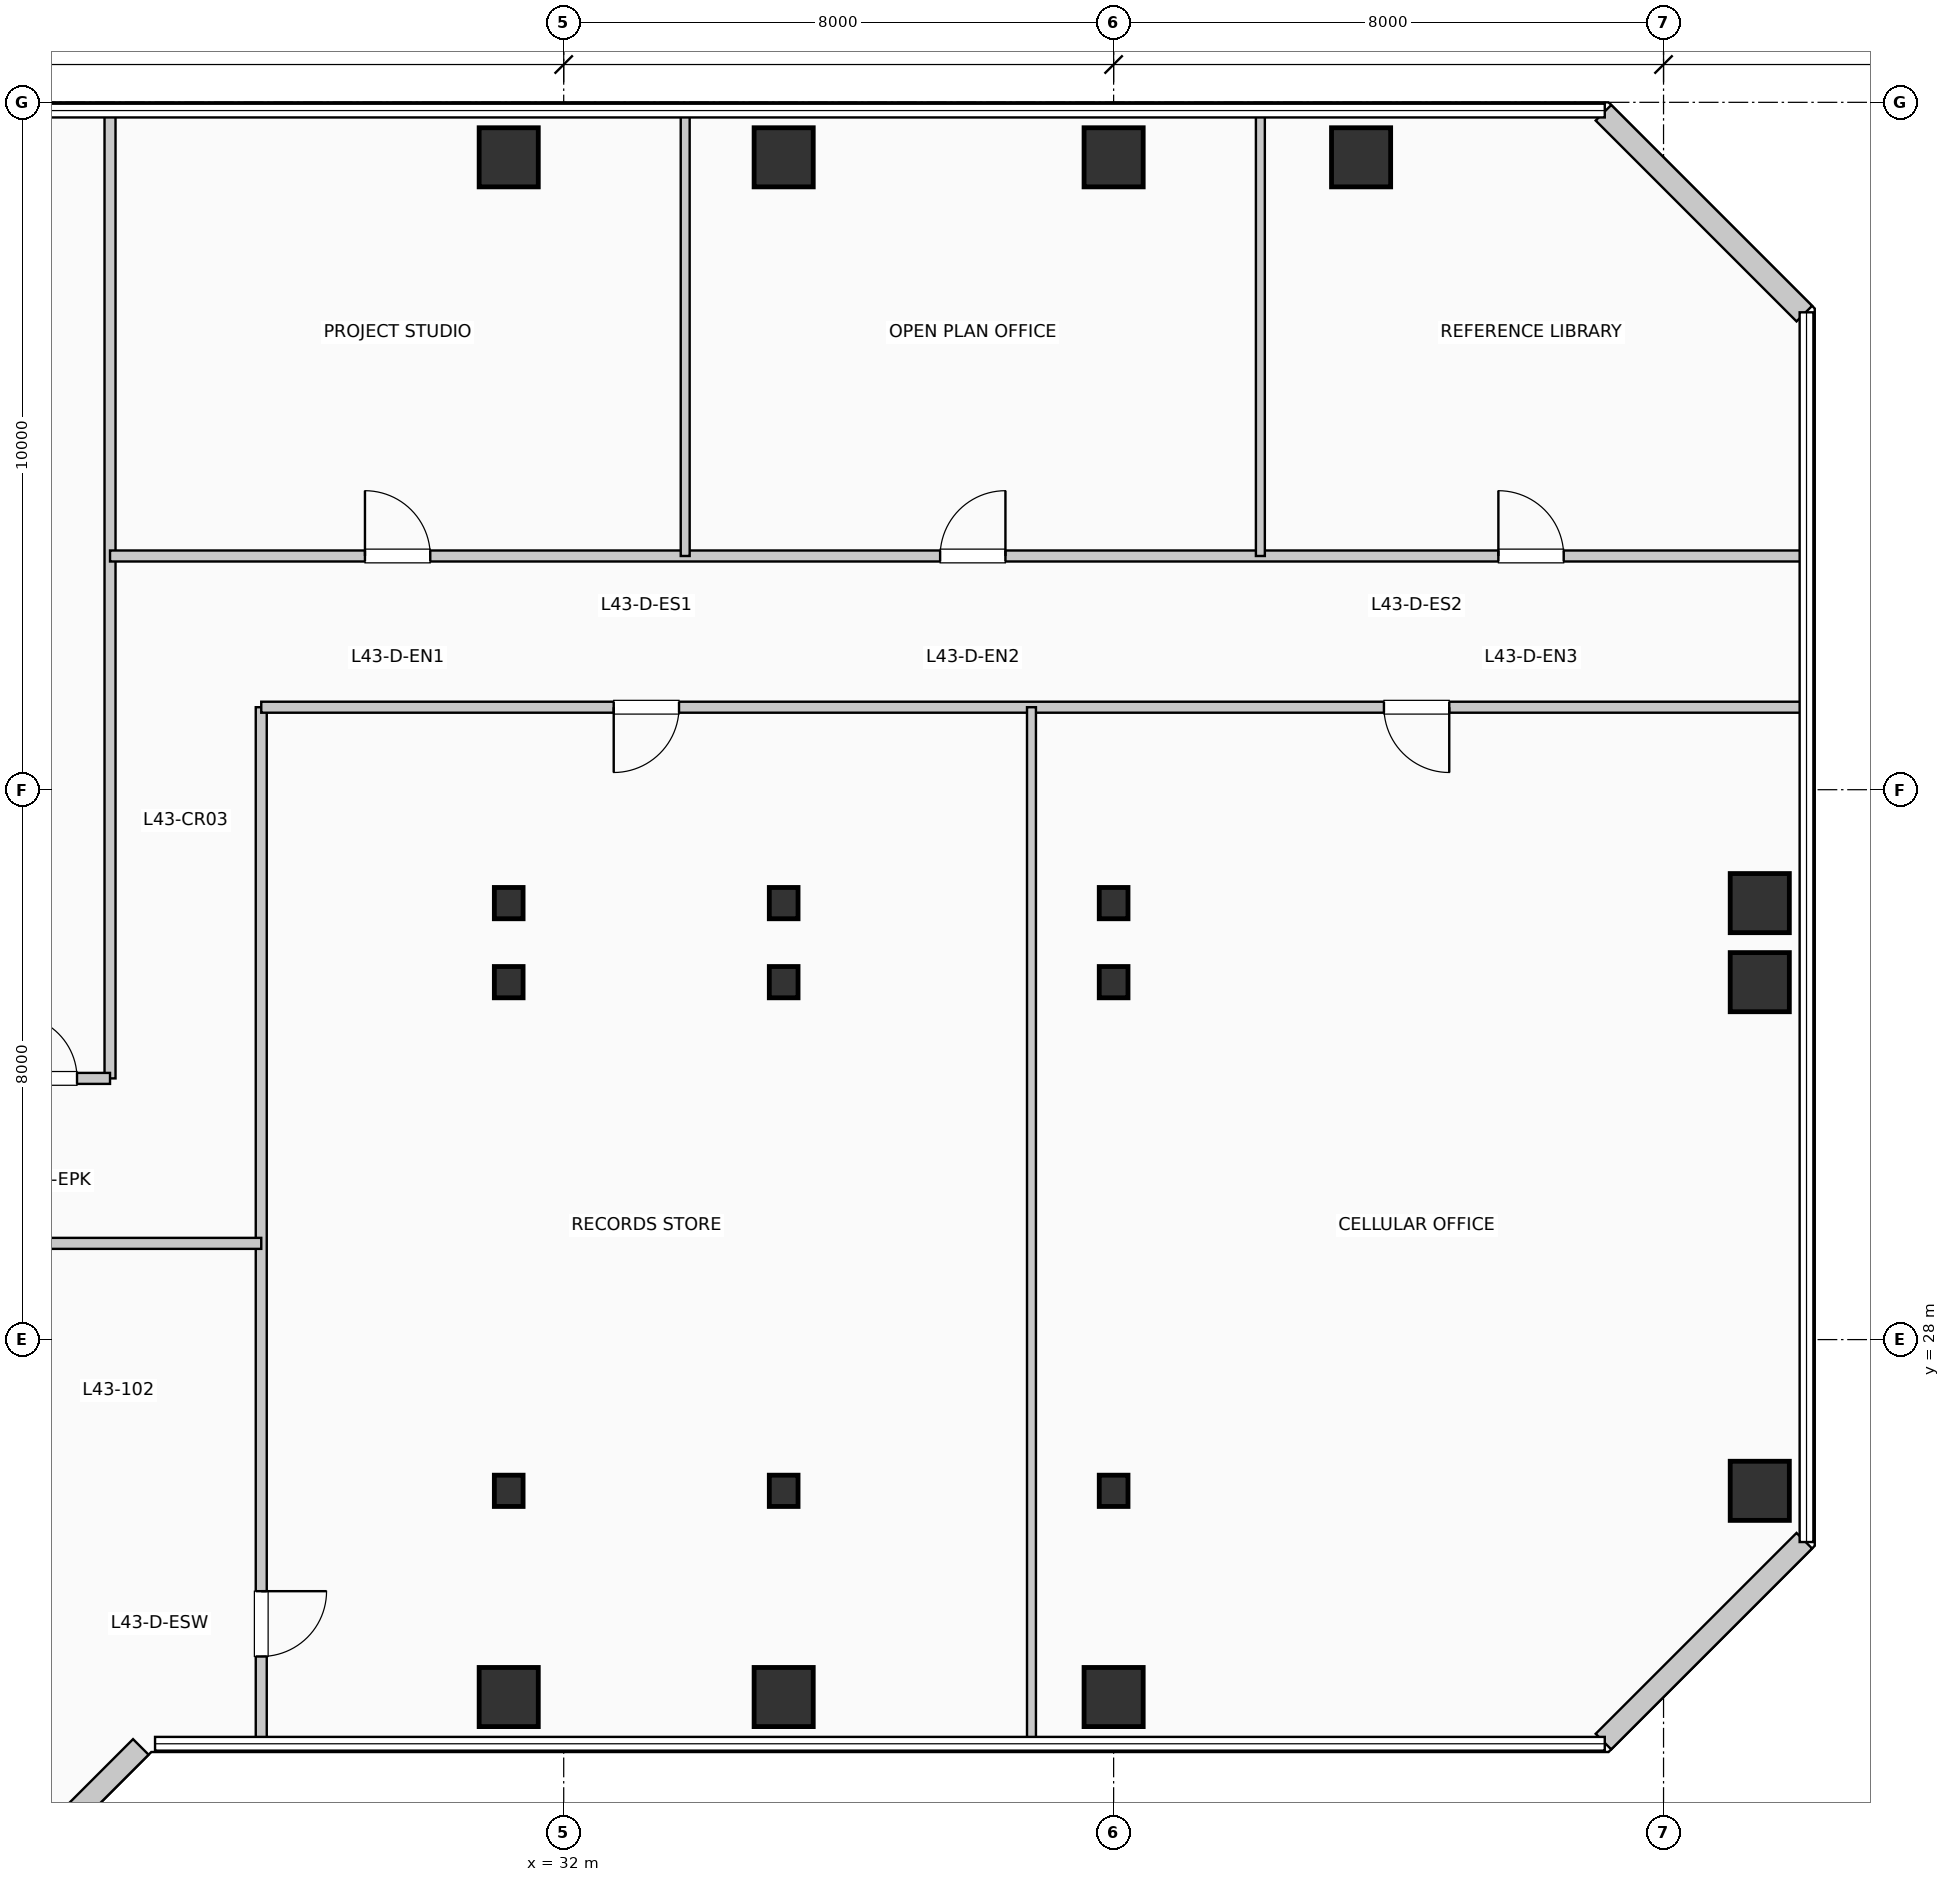
"""IFC4 building model, lengths in metres.
Left out: names, types, materials, properties, quantities, classifications, styles, units other than length and angle.
Written with IfcOpenShell. Run it as: python <this file> out.ifc"""

import sys

from ifc_helpers import new_model, si_unit, direction, frame, frame_2d, origin, origin_2d, place, context, subcontext, project, spatial, rectangle, i_section, extrude, element, fill, save


model = new_model("IFC4")
c1 = context("Model", 3, precision=1e-05, world=origin(), true_north=direction((0.0, 1.0)))
c2 = subcontext(c1, "Body", "Model", "MODEL_VIEW")
j1 = project(units=[si_unit("LENGTHUNIT", "METRE"), si_unit("PLANEANGLEUNIT", "RADIAN")], contexts=[c1])
p1 = place(None, origin())
s1 = spatial("IfcSite", under=j1, at=p1, CompositionType="ELEMENT")
p2 = place(p1, origin())
s2 = spatial("IfcBuilding", under=s1, at=p2, CompositionType="ELEMENT")
p3 = place(p2, frame((0.0, 0.0, 179.52)))
s3 = spatial("IfcBuildingStorey", under=s2, at=p3, CompositionType="ELEMENT", Elevation=179.52)
p4 = place(p3, frame((31.2, 22.8, 0.0), z_axis=(0.0, 0.0, 1.0), x_axis=(1.0, 0.0, 0.0)))
e1 = element("IfcColumn", 1, at=p4, inside=s3, PredefinedType="COLUMN", context=c2, shape_type="SweptSolid", body=[
    extrude(rectangle(XDim=0.86, YDim=0.86, at=origin_2d()), origin(), (0.0, 0.0, 1.0), 3.96),
])
for number, where, z_axis, x_axis in (
    (2, (31.2, 25.8, 0.0), (0.0, 0.0, 1.0), (1.0, 0.0, 0.0)),
    (3, (31.2, 33.2, 0.0), (0.0, 0.0, 1.0), (1.0, 0.0, 0.0)),
    (4, (31.2, 34.35, 0.0), (0.0, 0.0, 1.0), (1.0, 0.0, 0.0)),
):
    element("IfcColumn", number, at=place(p3, frame(where, z_axis=z_axis, x_axis=x_axis)), inside=s3, PredefinedType="COLUMN", context=c2, shape_type="SweptSolid", body=[
        extrude(i_section(OverallWidth=0.418, OverallDepth=0.455, WebThickness=0.032, FlangeThickness=0.051, at=origin_2d()), origin(), (0.0, 0.0, 1.0), 3.96),
    ])
for number, where, z_axis, x_axis in (
    (5, (31.2, 45.2, 0.0), (0.0, 0.0, 1.0), (1.0, 0.0, 0.0)),
    (6, (35.2, 22.8, 0.0), (0.0, 0.0, 1.0), (1.0, 0.0, 0.0)),
):
    element("IfcColumn", number, at=place(p3, frame(where, z_axis=z_axis, x_axis=x_axis)), inside=s3, PredefinedType="COLUMN", context=c2, shape_type="SweptSolid", body=[
        extrude(rectangle(XDim=0.86, YDim=0.86, at=origin_2d()), origin(), (0.0, 0.0, 1.0), 3.96),
    ])
for number, where, z_axis, x_axis in (
    (7, (35.2, 25.8, 0.0), (0.0, 0.0, 1.0), (1.0, 0.0, 0.0)),
    (8, (35.2, 33.2, 0.0), (0.0, 0.0, 1.0), (1.0, 0.0, 0.0)),
    (9, (35.2, 34.35, 0.0), (0.0, 0.0, 1.0), (1.0, 0.0, 0.0)),
):
    element("IfcColumn", number, at=place(p3, frame(where, z_axis=z_axis, x_axis=x_axis)), inside=s3, PredefinedType="COLUMN", context=c2, shape_type="SweptSolid", body=[
        extrude(i_section(OverallWidth=0.418, OverallDepth=0.455, WebThickness=0.032, FlangeThickness=0.051, at=origin_2d()), origin(), (0.0, 0.0, 1.0), 3.96),
    ])
for number, where, z_axis, x_axis in (
    (10, (35.2, 45.2, 0.0), (0.0, 0.0, 1.0), (1.0, 0.0, 0.0)),
    (11, (40.0, 22.8, 0.0), (0.0, 0.0, 1.0), (1.0, 0.0, 0.0)),
):
    element("IfcColumn", number, at=place(p3, frame(where, z_axis=z_axis, x_axis=x_axis)), inside=s3, PredefinedType="COLUMN", context=c2, shape_type="SweptSolid", body=[
        extrude(rectangle(XDim=0.86, YDim=0.86, at=origin_2d()), origin(), (0.0, 0.0, 1.0), 3.96),
    ])
for number, where, z_axis, x_axis in (
    (12, (40.0, 25.8, 0.0), (0.0, 0.0, 1.0), (1.0, 0.0, 0.0)),
    (13, (40.0, 33.2, 0.0), (0.0, 0.0, 1.0), (1.0, 0.0, 0.0)),
    (14, (40.0, 34.35, 0.0), (0.0, 0.0, 1.0), (1.0, 0.0, 0.0)),
):
    element("IfcColumn", number, at=place(p3, frame(where, z_axis=z_axis, x_axis=x_axis)), inside=s3, PredefinedType="COLUMN", context=c2, shape_type="SweptSolid", body=[
        extrude(i_section(OverallWidth=0.418, OverallDepth=0.455, WebThickness=0.032, FlangeThickness=0.051, at=origin_2d()), origin(), (0.0, 0.0, 1.0), 3.96),
    ])
for number, where, z_axis, x_axis in (
    (15, (40.0, 45.2, 0.0), (0.0, 0.0, 1.0), (1.0, 0.0, 0.0)),
    (16, (43.6, 45.2, 0.0), (0.0, 0.0, 1.0), (1.0, 0.0, 0.0)),
    (17, (49.4, 25.8, 0.0), (0.0, 0.0, 1.0), (1.0, 0.0, 0.0)),
    (18, (49.4, 33.2, 0.0), (0.0, 0.0, 1.0), (1.0, 0.0, 0.0)),
    (19, (49.4, 34.35, 0.0), (0.0, 0.0, 1.0), (1.0, 0.0, 0.0)),
):
    element("IfcColumn", number, at=place(p3, frame(where, z_axis=z_axis, x_axis=x_axis)), inside=s3, PredefinedType="COLUMN", context=c2, shape_type="SweptSolid", body=[
        extrude(rectangle(XDim=0.86, YDim=0.86, at=origin_2d()), origin(), (0.0, 0.0, 1.0), 3.96),
    ])
p5 = place(p3, frame((23.926, 20.152, 0.0), z_axis=(0.0, 0.0, 1.0), x_axis=(0.707106781187, 0.707106781187, 0.0)))
e20 = element("IfcWall", 20, at=p5, inside=s3, PredefinedType="SOLIDWALL", context=c2, shape_type="SweptSolid", body=[
    extrude(rectangle(XDim=2.718, YDim=0.32, at=frame_2d((1.359, 0.0))), origin(), (0.0, 0.0, 1.0), 3.71),
])
for number, where, z_axis, x_axis in (
    (21, (47.126, 22.152, 0.0), (0.0, 0.0, 1.0), (0.707, 0.707, 0.0)),
    (22, (50.048, 42.926, 0.0), (0.0, 0.0, 1.0), (-0.707, 0.707, 0.0)),
):
    element("IfcWall", number, at=place(p3, frame(where, z_axis=z_axis, x_axis=x_axis)), inside=s3, PredefinedType="SOLIDWALL", context=c2, shape_type="SweptSolid", body=[
        extrude(rectangle(XDim=4.133, YDim=0.32, at=frame_2d((2.066, 0.0))), origin(), (0.0, 0.0, 1.0), 3.71),
    ])
p6 = place(p3, frame((25.4, 31.8, 0.0), z_axis=(0.0, 0.0, 1.0), x_axis=(0.0, 1.0, 0.0)))
e23 = element("IfcWall", 23, at=p6, inside=s3, PredefinedType="PARTITIONING", context=c2, shape_type="SweptSolid", body=[
    extrude(rectangle(XDim=14.01, YDim=0.16, at=frame_2d((7.005, 0.0))), origin(), (0.0, 0.0, 1.0), 3.71),
])
p7 = place(p3, frame((27.6, 22.19, 0.0), z_axis=(0.0, 0.0, 1.0), x_axis=(0.0, 1.0, 0.0)))
e24 = element("IfcWall", 24, at=p7, inside=s3, PredefinedType="PARTITIONING", context=c2, shape_type="SweptSolid", body=[
    extrude(rectangle(XDim=15.01, YDim=0.16, at=frame_2d((7.505, 0.0))), origin(), (0.0, 0.0, 1.0), 3.71),
])
p8 = place(p7, frame((2.15, 0.0, 0.0), z_axis=(0.0, 0.0, 1.0), x_axis=(-1.0, 0.0, 0.0)))
e25 = element("IfcOpeningElement", 25, at=p8, cuts=e24, PredefinedType="OPENING", context=c2, shape_type="SweptSolid", body=[
    extrude(rectangle(XDim=0.95, YDim=2.15, at=frame_2d((0.475, 1.075))), frame((0.0, 0.09, 0.0), z_axis=(0.0, -1.0, 0.0), x_axis=(1.0, 0.0, 0.0)), (0.0, 0.0, 1.0), 0.18),
])
p9 = place(p3, frame((23.45, 29.4, 0.0), z_axis=(0.0, 0.0, 1.0), x_axis=(1.0, 0.0, 0.0)))
e26 = element("IfcWall", 26, at=p9, inside=s3, PredefinedType="PARTITIONING", context=c2, shape_type="SweptSolid", body=[
    extrude(rectangle(XDim=4.15, YDim=0.16, at=frame_2d((2.075, 0.0))), origin(), (0.0, 0.0, 1.0), 3.365),
])
p10 = place(p3, frame((27.6, 37.2, 0.0), z_axis=(0.0, 0.0, 1.0), x_axis=(1.0, 0.0, 0.0)))
e27 = element("IfcWall", 27, at=p10, inside=s3, PredefinedType="PARTITIONING", context=c2, shape_type="SweptSolid", body=[
    extrude(rectangle(XDim=22.41, YDim=0.16, at=frame_2d((11.205, 0.0))), origin(), (0.0, 0.0, 1.0), 3.71),
])
p11 = place(p10, frame((6.077, 0.0, 0.0), z_axis=(0.0, 0.0, 1.0), x_axis=(-1.0, 0.0, 0.0)))
e28 = element("IfcOpeningElement", 28, at=p11, cuts=e27, PredefinedType="OPENING", context=c2, shape_type="SweptSolid", body=[
    extrude(rectangle(XDim=0.95, YDim=2.15, at=frame_2d((0.475, 1.075))), frame((0.0, 0.09, 0.0), z_axis=(0.0, -1.0, 0.0), x_axis=(1.0, 0.0, 0.0)), (0.0, 0.0, 1.0), 0.18),
])
p12 = place(p10, frame((17.282, 0.0, 0.0), z_axis=(0.0, 0.0, 1.0), x_axis=(-1.0, 0.0, 0.0)))
e29 = element("IfcOpeningElement", 29, at=p12, cuts=e27, PredefinedType="OPENING", context=c2, shape_type="SweptSolid", body=[
    extrude(rectangle(XDim=0.95, YDim=2.15, at=frame_2d((0.475, 1.075))), frame((0.0, 0.09, 0.0), z_axis=(0.0, -1.0, 0.0), x_axis=(1.0, 0.0, 0.0)), (0.0, 0.0, 1.0), 0.18),
])
p13 = place(p3, frame((25.4, 39.4, 0.0), z_axis=(0.0, 0.0, 1.0), x_axis=(1.0, 0.0, 0.0)))
e30 = element("IfcWall", 30, at=p13, inside=s3, PredefinedType="PARTITIONING", context=c2, shape_type="SweptSolid", body=[
    extrude(rectangle(XDim=24.61, YDim=0.16, at=frame_2d((12.305, 0.0))), origin(), (0.0, 0.0, 1.0), 3.365),
])
p14 = place(p13, frame((3.709, 0.0, 0.0)))
e31 = element("IfcOpeningElement", 31, at=p14, cuts=e30, PredefinedType="OPENING", context=c2, shape_type="SweptSolid", body=[
    extrude(rectangle(XDim=0.95, YDim=2.15, at=frame_2d((0.475, 1.075))), frame((0.0, 0.09, 0.0), z_axis=(0.0, -1.0, 0.0), x_axis=(1.0, 0.0, 0.0)), (0.0, 0.0, 1.0), 0.18),
])
p15 = place(p13, frame((12.076, 0.0, 0.0)))
e32 = element("IfcOpeningElement", 32, at=p15, cuts=e30, PredefinedType="OPENING", context=c2, shape_type="SweptSolid", body=[
    extrude(rectangle(XDim=0.95, YDim=2.15, at=frame_2d((0.475, 1.075))), frame((0.0, 0.09, 0.0), z_axis=(0.0, -1.0, 0.0), x_axis=(1.0, 0.0, 0.0)), (0.0, 0.0, 1.0), 0.18),
])
p16 = place(p13, frame((20.198, 0.0, 0.0)))
e33 = element("IfcOpeningElement", 33, at=p16, cuts=e30, PredefinedType="OPENING", context=c2, shape_type="SweptSolid", body=[
    extrude(rectangle(XDim=0.95, YDim=2.15, at=frame_2d((0.475, 1.075))), frame((0.0, 0.09, 0.0), z_axis=(0.0, -1.0, 0.0), x_axis=(1.0, 0.0, 0.0)), (0.0, 0.0, 1.0), 0.18),
])
p17 = place(p3, frame((23.6, 31.8, 0.0), z_axis=(0.0, 0.0, 1.0), x_axis=(1.0, 0.0, 0.0)))
e34 = element("IfcWall", 34, at=p17, inside=s3, PredefinedType="PARTITIONING", context=c2, shape_type="SweptSolid", body=[
    extrude(rectangle(XDim=1.8, YDim=0.16, at=frame_2d((0.9, 0.0))), origin(), (0.0, 0.0, 1.0), 3.71),
])
p18 = place(p17, frame((0.4, 0.0, 0.0)))
e35 = element("IfcOpeningElement", 35, at=p18, cuts=e34, PredefinedType="OPENING", context=c2, shape_type="SweptSolid", body=[
    extrude(rectangle(XDim=0.92, YDim=2.1, at=frame_2d((0.46, 1.05))), frame((0.0, 0.09, 0.0), z_axis=(0.0, -1.0, 0.0), x_axis=(1.0, 0.0, 0.0)), (0.0, 0.0, 1.0), 0.18),
])
p19 = place(p3, frame((38.805, 22.19, 0.0), z_axis=(0.0, 0.0, 1.0), x_axis=(0.0, 1.0, 0.0)))
e36 = element("IfcWall", 36, at=p19, inside=s3, PredefinedType="PARTITIONING", context=c2, shape_type="SweptSolid", body=[
    extrude(rectangle(XDim=15.01, YDim=0.13, at=frame_2d((7.505, 0.0))), origin(), (0.0, 0.0, 1.0), 3.71),
])
for number, where, z_axis, x_axis in (
    (37, (33.767, 39.4, 0.0), (0.0, 0.0, 1.0), (0.0, 1.0, 0.0)),
    (38, (42.135, 39.4, 0.0), (0.0, 0.0, 1.0), (0.0, 1.0, 0.0)),
):
    element("IfcWall", number, at=place(p3, frame(where, z_axis=z_axis, x_axis=x_axis)), inside=s3, PredefinedType="PARTITIONING", context=c2, shape_type="SweptSolid", body=[
        extrude(rectangle(XDim=6.41, YDim=0.13, at=frame_2d((3.205, 0.0))), origin(), (0.0, 0.0, 1.0), 3.71),
    ])
p20 = place(p18, origin())
e39 = element("IfcDoor", 39, at=p20, inside=s3, OperationType="SINGLE_SWING_LEFT", PredefinedType="DOOR", context=c2, shape_type="SweptSolid", body=[
    extrude(rectangle(XDim=0.92, YDim=2.1, at=frame_2d((0.46, 1.05))), frame((0.0, 0.025, 0.0), z_axis=(0.0, -1.0, 0.0), x_axis=(1.0, 0.0, 0.0)), (0.0, 0.0, 1.0), 0.05),
])
fill(e35, e39)
p21 = place(p8, origin())
e40 = element("IfcDoor", 40, at=p21, inside=s3, OperationType="SINGLE_SWING_RIGHT", PredefinedType="DOOR", context=c2, shape_type="SweptSolid", body=[
    extrude(rectangle(XDim=0.95, YDim=2.15, at=frame_2d((0.475, 1.075))), frame((0.0, 0.025, 0.0), z_axis=(0.0, -1.0, 0.0), x_axis=(1.0, 0.0, 0.0)), (0.0, 0.0, 1.0), 0.05),
])
fill(e25, e40)
p22 = place(p11, origin())
e41 = element("IfcDoor", 41, at=p22, inside=s3, OperationType="SINGLE_SWING_LEFT", PredefinedType="DOOR", context=c2, shape_type="SweptSolid", body=[
    extrude(rectangle(XDim=0.95, YDim=2.15, at=frame_2d((0.475, 1.075))), frame((0.0, 0.025, 0.0), z_axis=(0.0, -1.0, 0.0), x_axis=(1.0, 0.0, 0.0)), (0.0, 0.0, 1.0), 0.05),
])
fill(e28, e41)
p23 = place(p12, origin())
e42 = element("IfcDoor", 42, at=p23, inside=s3, OperationType="SINGLE_SWING_RIGHT", PredefinedType="DOOR", context=c2, shape_type="SweptSolid", body=[
    extrude(rectangle(XDim=0.95, YDim=2.15, at=frame_2d((0.475, 1.075))), frame((0.0, 0.025, 0.0), z_axis=(0.0, -1.0, 0.0), x_axis=(1.0, 0.0, 0.0)), (0.0, 0.0, 1.0), 0.05),
])
fill(e29, e42)
p24 = place(p14, origin())
e43 = element("IfcDoor", 43, at=p24, inside=s3, OperationType="SINGLE_SWING_LEFT", PredefinedType="DOOR", context=c2, shape_type="SweptSolid", body=[
    extrude(rectangle(XDim=0.95, YDim=2.15, at=frame_2d((0.475, 1.075))), frame((0.0, 0.025, 0.0), z_axis=(0.0, -1.0, 0.0), x_axis=(1.0, 0.0, 0.0)), (0.0, 0.0, 1.0), 0.05),
])
fill(e31, e43)
p25 = place(p15, origin())
e44 = element("IfcDoor", 44, at=p25, inside=s3, OperationType="SINGLE_SWING_RIGHT", PredefinedType="DOOR", context=c2, shape_type="SweptSolid", body=[
    extrude(rectangle(XDim=0.95, YDim=2.15, at=frame_2d((0.475, 1.075))), frame((0.0, 0.025, 0.0), z_axis=(0.0, -1.0, 0.0), x_axis=(1.0, 0.0, 0.0)), (0.0, 0.0, 1.0), 0.05),
])
fill(e32, e44)
p26 = place(p16, origin())
e45 = element("IfcDoor", 45, at=p26, inside=s3, OperationType="SINGLE_SWING_LEFT", PredefinedType="DOOR", context=c2, shape_type="SweptSolid", body=[
    extrude(rectangle(XDim=0.95, YDim=2.15, at=frame_2d((0.475, 1.075))), frame((0.0, 0.025, 0.0), z_axis=(0.0, -1.0, 0.0), x_axis=(1.0, 0.0, 0.0)), (0.0, 0.0, 1.0), 0.05),
])
fill(e33, e45)
save(model, sys.argv[1])
